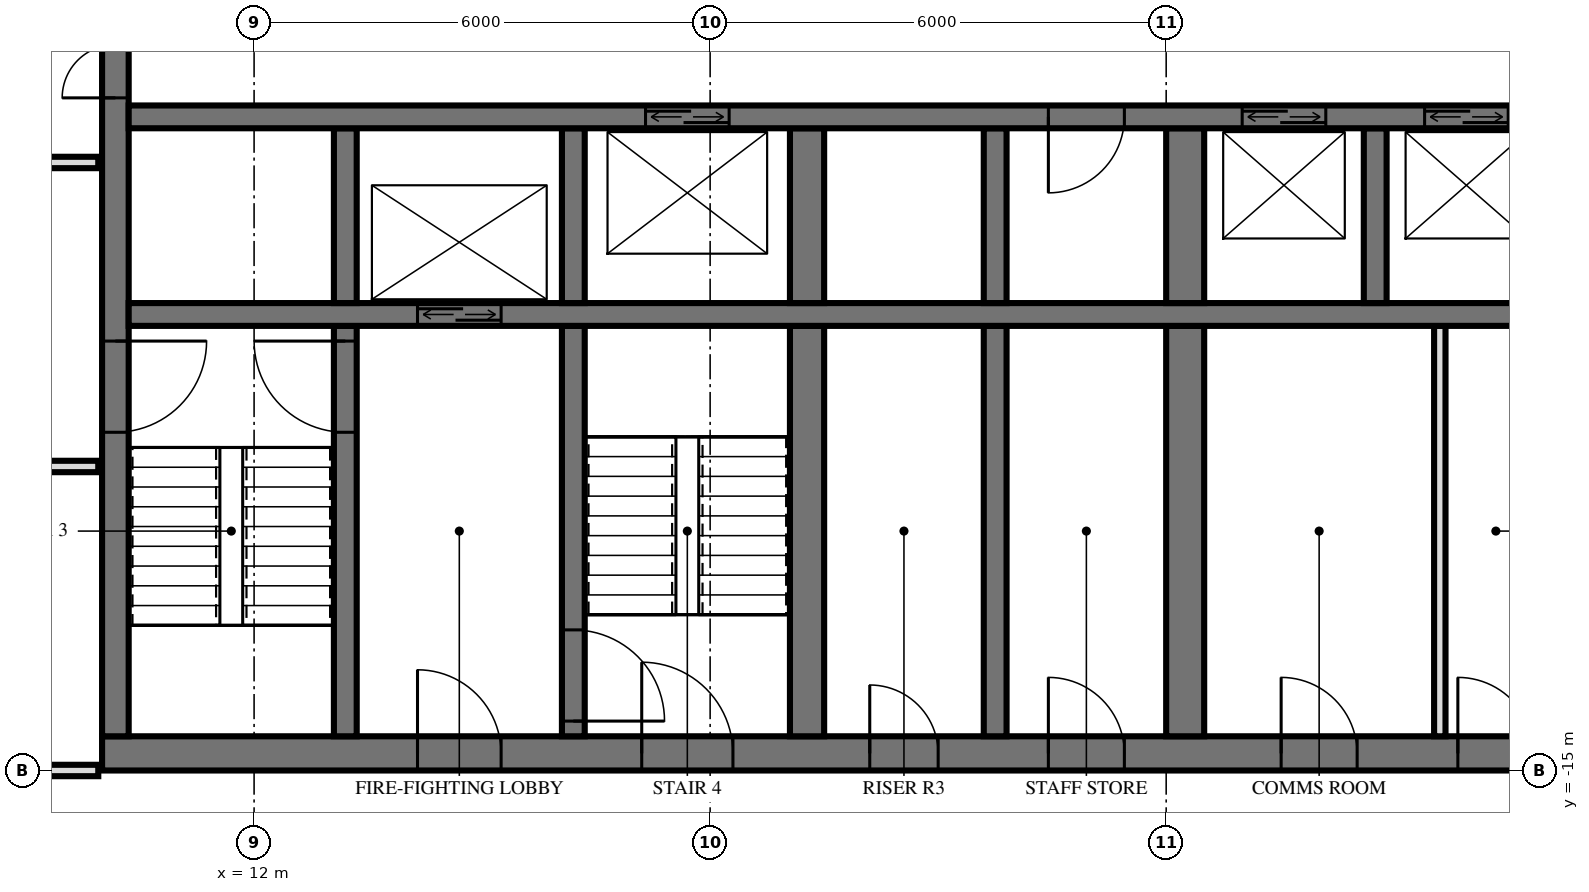
"""IFC4 building model, lengths in metres.
Left out: names, types, materials, properties, quantities, classifications, styles, units other than length and angle.
Written with IfcOpenShell. Run it as: python <this file> out.ifc"""

import sys

from ifc_helpers import new_model, si_unit, direction, frame, frame_2d, origin, place, context, subcontext, project, spatial, rectangle, extrude, element, fill, save


model = new_model("IFC4")
c1 = context("Model", 3, precision=1e-05, world=origin(), true_north=direction((0.0, 1.0)))
c2 = subcontext(c1, "Body", "Model", "MODEL_VIEW")
j1 = project(units=[si_unit("LENGTHUNIT", "METRE"), si_unit("PLANEANGLEUNIT", "RADIAN")], contexts=[c1])
p1 = place(None, origin())
s1 = spatial("IfcSite", under=j1, at=p1, CompositionType="ELEMENT")
p2 = place(p1, origin())
s2 = spatial("IfcBuilding", under=s1, at=p2, CompositionType="ELEMENT")
p3 = place(p2, frame((0.0, 0.0, 31.2)))
s3 = spatial("IfcBuildingStorey", under=s2, at=p3, CompositionType="ELEMENT", Elevation=31.2)
p4 = place(p3, frame((10.0, -14.775, 0.0), z_axis=(0.0, 0.0, 1.0), x_axis=(1.0, 0.0, 0.0)))
e1 = element("IfcWall", 1, at=p4, inside=s3, PredefinedType="SHEAR", context=c2, shape_type="SweptSolid", body=[
    extrude(rectangle(XDim=19.5, YDim=0.45, at=frame_2d((9.75, 0.0))), origin(), (0.0, 0.0, 1.0), 3.6),
])
p5 = place(p4, frame((7.1, 0.0, 0.0)))
e2 = element("IfcOpeningElement", 2, at=p5, cuts=e1, PredefinedType="OPENING", context=c2, shape_type="SweptSolid", body=[
    extrude(rectangle(XDim=1.2, YDim=2.1, at=frame_2d((0.6, 1.05))), frame((0.0, 0.235, 0.0), z_axis=(0.0, -1.0, 0.0), x_axis=(1.0, 0.0, 0.0)), (0.0, 0.0, 1.0), 0.47),
])
p6 = place(p4, frame((4.15, 0.0, 0.0)))
e3 = element("IfcOpeningElement", 3, at=p6, cuts=e1, PredefinedType="OPENING", context=c2, shape_type="SweptSolid", body=[
    extrude(rectangle(XDim=1.1, YDim=2.1, at=frame_2d((0.55, 1.05))), frame((0.0, 0.235, 0.0), z_axis=(0.0, -1.0, 0.0), x_axis=(1.0, 0.0, 0.0)), (0.0, 0.0, 1.0), 0.47),
])
p7 = place(p4, frame((10.1, 0.0, 0.0)))
e4 = element("IfcOpeningElement", 4, at=p7, cuts=e1, PredefinedType="OPENING", context=c2, shape_type="SweptSolid", body=[
    extrude(rectangle(XDim=0.9, YDim=2.1, at=frame_2d((0.45, 1.05))), frame((0.0, 0.235, 0.0), z_axis=(0.0, -1.0, 0.0), x_axis=(1.0, 0.0, 0.0)), (0.0, 0.0, 1.0), 0.47),
])
p8 = place(p4, frame((12.45, 0.0, 0.0)))
e5 = element("IfcOpeningElement", 5, at=p8, cuts=e1, PredefinedType="OPENING", context=c2, shape_type="SweptSolid", body=[
    extrude(rectangle(XDim=1.0, YDim=2.1, at=frame_2d((0.5, 1.05))), frame((0.0, 0.235, 0.0), z_axis=(0.0, -1.0, 0.0), x_axis=(1.0, 0.0, 0.0)), (0.0, 0.0, 1.0), 0.47),
])
p9 = place(p4, frame((15.512, 0.0, 0.0)))
e6 = element("IfcOpeningElement", 6, at=p9, cuts=e1, PredefinedType="OPENING", context=c2, shape_type="SweptSolid", body=[
    extrude(rectangle(XDim=1.0, YDim=2.1, at=frame_2d((0.5, 1.05))), frame((0.0, 0.235, 0.0), z_axis=(0.0, -1.0, 0.0), x_axis=(1.0, 0.0, 0.0)), (0.0, 0.0, 1.0), 0.47),
])
p10 = place(p4, frame((17.837, 0.0, 0.0)))
e7 = element("IfcOpeningElement", 7, at=p10, cuts=e1, PredefinedType="OPENING", context=c2, shape_type="SweptSolid", body=[
    extrude(rectangle(XDim=1.0, YDim=2.1, at=frame_2d((0.5, 1.05))), frame((0.0, 0.235, 0.0), z_axis=(0.0, -1.0, 0.0), x_axis=(1.0, 0.0, 0.0)), (0.0, 0.0, 1.0), 0.47),
])
p11 = place(p3, frame((10.175, -14.55, 0.0), z_axis=(0.0, 0.0, 1.0), x_axis=(0.0, 1.0, 0.0)))
e8 = element("IfcWall", 8, at=p11, inside=s3, PredefinedType="SHEAR", context=c2, shape_type="SweptSolid", body=[
    extrude(rectangle(XDim=14.1, YDim=0.35, at=frame_2d((7.05, 0.0))), origin(), (0.0, 0.0, 1.0), 3.6),
])
p12 = place(p11, frame((8.4, 0.0, 0.0)))
e9 = element("IfcOpeningElement", 9, at=p12, cuts=e8, PredefinedType="OPENING", context=c2, shape_type="SweptSolid", body=[
    extrude(rectangle(XDim=1.4, YDim=2.4, at=frame_2d((0.7, 1.2))), frame((0.0, 0.185, 0.0), z_axis=(0.0, -1.0, 0.0), x_axis=(1.0, 0.0, 0.0)), (0.0, 0.0, 1.0), 0.37),
])
p13 = place(p11, frame((10.0, 0.0, 0.0)))
e10 = element("IfcOpeningElement", 10, at=p13, cuts=e8, PredefinedType="OPENING", context=c2, shape_type="SweptSolid", body=[
    extrude(rectangle(XDim=1.4, YDim=2.4, at=frame_2d((0.7, 1.2))), frame((0.0, 0.185, 0.0), z_axis=(0.0, -1.0, 0.0), x_axis=(1.0, 0.0, 0.0)), (0.0, 0.0, 1.0), 0.37),
])
p14 = place(p11, frame((4.0, 0.0, 0.0)))
e11 = element("IfcOpeningElement", 11, at=p14, cuts=e8, PredefinedType="OPENING", context=c2, shape_type="SweptSolid", body=[
    extrude(rectangle(XDim=1.2, YDim=2.1, at=frame_2d((0.6, 1.05))), frame((0.0, 0.185, 0.0), z_axis=(0.0, -1.0, 0.0), x_axis=(1.0, 0.0, 0.0)), (0.0, 0.0, 1.0), 0.37),
])
p15 = place(p3, frame((10.35, -6.4, 0.0), z_axis=(0.0, 0.0, 1.0), x_axis=(1.0, 0.0, 0.0)))
e12 = element("IfcWall", 12, at=p15, inside=s3, PredefinedType="SHEAR", context=c2, shape_type="SweptSolid", body=[
    extrude(rectangle(XDim=18.7, YDim=0.3, at=frame_2d((9.35, 0.0))), origin(), (0.0, 0.0, 1.0), 3.6),
])
p16 = place(p15, frame((14.65, 0.0, 0.0)))
e13 = element("IfcOpeningElement", 13, at=p16, cuts=e12, PredefinedType="OPENING", context=c2, shape_type="SweptSolid", body=[
    extrude(rectangle(XDim=1.1, YDim=2.1, at=frame_2d((0.55, 1.05))), frame((0.0, 0.16, 0.0), z_axis=(0.0, -1.0, 0.0), x_axis=(1.0, 0.0, 0.0)), (0.0, 0.0, 1.0), 0.32),
])
p17 = place(p15, frame((17.05, 0.0, 0.0)))
e14 = element("IfcOpeningElement", 14, at=p17, cuts=e12, PredefinedType="OPENING", context=c2, shape_type="SweptSolid", body=[
    extrude(rectangle(XDim=1.1, YDim=2.1, at=frame_2d((0.55, 1.05))), frame((0.0, 0.16, 0.0), z_axis=(0.0, -1.0, 0.0), x_axis=(1.0, 0.0, 0.0)), (0.0, 0.0, 1.0), 0.32),
])
p18 = place(p15, frame((6.8, 0.0, 0.0)))
e15 = element("IfcOpeningElement", 15, at=p18, cuts=e12, PredefinedType="OPENING", context=c2, shape_type="SweptSolid", body=[
    extrude(rectangle(XDim=1.1, YDim=2.1, at=frame_2d((0.55, 1.05))), frame((0.0, 0.16, 0.0), z_axis=(0.0, -1.0, 0.0), x_axis=(1.0, 0.0, 0.0)), (0.0, 0.0, 1.0), 0.32),
])
p19 = place(p15, frame((12.1, 0.0, 0.0)))
e16 = element("IfcOpeningElement", 16, at=p19, cuts=e12, PredefinedType="OPENING", context=c2, shape_type="SweptSolid", body=[
    extrude(rectangle(XDim=1.0, YDim=2.1, at=frame_2d((0.5, 1.05))), frame((0.0, 0.16, 0.0), z_axis=(0.0, -1.0, 0.0), x_axis=(1.0, 0.0, 0.0)), (0.0, 0.0, 1.0), 0.32),
])
p20 = place(p3, frame((10.35, -9.0, 0.0), z_axis=(0.0, 0.0, 1.0), x_axis=(1.0, 0.0, 0.0)))
e17 = element("IfcWall", 17, at=p20, inside=s3, PredefinedType="SHEAR", context=c2, shape_type="SweptSolid", body=[
    extrude(rectangle(XDim=18.7, YDim=0.3, at=frame_2d((9.35, 0.0))), origin(), (0.0, 0.0, 1.0), 3.6),
])
p21 = place(p20, frame((3.8, 0.0, 0.0)))
e18 = element("IfcOpeningElement", 18, at=p21, cuts=e17, PredefinedType="OPENING", context=c2, shape_type="SweptSolid", body=[
    extrude(rectangle(XDim=1.1, YDim=2.1, at=frame_2d((0.55, 1.05))), frame((0.0, 0.16, 0.0), z_axis=(0.0, -1.0, 0.0), x_axis=(1.0, 0.0, 0.0)), (0.0, 0.0, 1.0), 0.32),
])
p22 = place(p3, frame((13.2, -8.85, 0.0), z_axis=(0.0, 0.0, 1.0), x_axis=(0.0, 1.0, 0.0)))
e19 = element("IfcWall", 19, at=p22, inside=s3, PredefinedType="SHEAR", context=c2, shape_type="SweptSolid", body=[
    extrude(rectangle(XDim=2.3, YDim=0.3, at=frame_2d((1.15, 0.0))), origin(), (0.0, 0.0, 1.0), 3.6),
])
p23 = place(p3, frame((13.2, -14.55, 0.0), z_axis=(0.0, 0.0, 1.0), x_axis=(0.0, 1.0, 0.0)))
e20 = element("IfcWall", 20, at=p23, inside=s3, PredefinedType="SHEAR", context=c2, shape_type="SweptSolid", body=[
    extrude(rectangle(XDim=5.4, YDim=0.3, at=frame_2d((2.7, 0.0))), origin(), (0.0, 0.0, 1.0), 3.6),
])
p24 = place(p23, frame((4.0, 0.0, 0.0)))
e21 = element("IfcOpeningElement", 21, at=p24, cuts=e20, PredefinedType="OPENING", context=c2, shape_type="SweptSolid", body=[
    extrude(rectangle(XDim=1.2, YDim=2.1, at=frame_2d((0.6, 1.05))), frame((0.0, 0.16, 0.0), z_axis=(0.0, -1.0, 0.0), x_axis=(1.0, 0.0, 0.0)), (0.0, 0.0, 1.0), 0.32),
])
p25 = place(p3, frame((16.2, -8.85, 0.0), z_axis=(0.0, 0.0, 1.0), x_axis=(0.0, 1.0, 0.0)))
e22 = element("IfcWall", 22, at=p25, inside=s3, PredefinedType="SHEAR", context=c2, shape_type="SweptSolid", body=[
    extrude(rectangle(XDim=2.3, YDim=0.3, at=frame_2d((1.15, 0.0))), origin(), (0.0, 0.0, 1.0), 3.6),
])
p26 = place(p3, frame((16.2, -14.55, 0.0), z_axis=(0.0, 0.0, 1.0), x_axis=(0.0, 1.0, 0.0)))
e23 = element("IfcWall", 23, at=p26, inside=s3, PredefinedType="SHEAR", context=c2, shape_type="SweptSolid", body=[
    extrude(rectangle(XDim=5.4, YDim=0.3, at=frame_2d((2.7, 0.0))), origin(), (0.0, 0.0, 1.0), 3.6),
])
p27 = place(p26, frame((0.2, 0.0, 0.0)))
e24 = element("IfcOpeningElement", 24, at=p27, cuts=e23, PredefinedType="OPENING", context=c2, shape_type="SweptSolid", body=[
    extrude(rectangle(XDim=1.2, YDim=2.1, at=frame_2d((0.6, 1.05))), frame((0.0, 0.16, 0.0), z_axis=(0.0, -1.0, 0.0), x_axis=(1.0, 0.0, 0.0)), (0.0, 0.0, 1.0), 0.32),
])
p28 = place(p3, frame((19.275, -8.85, 0.0), z_axis=(0.0, 0.0, 1.0), x_axis=(0.0, 1.0, 0.0)))
e25 = element("IfcWall", 25, at=p28, inside=s3, PredefinedType="SHEAR", context=c2, shape_type="SweptSolid", body=[
    extrude(rectangle(XDim=2.3, YDim=0.45, at=frame_2d((1.15, 0.0))), origin(), (0.0, 0.0, 1.0), 3.6),
])
p29 = place(p3, frame((19.275, -14.55, 0.0), z_axis=(0.0, 0.0, 1.0), x_axis=(0.0, 1.0, 0.0)))
e26 = element("IfcWall", 26, at=p29, inside=s3, PredefinedType="SHEAR", context=c2, shape_type="SweptSolid", body=[
    extrude(rectangle(XDim=5.4, YDim=0.45, at=frame_2d((2.7, 0.0))), origin(), (0.0, 0.0, 1.0), 3.6),
])
p30 = place(p3, frame((21.75, -8.85, 0.0), z_axis=(0.0, 0.0, 1.0), x_axis=(0.0, 1.0, 0.0)))
e27 = element("IfcWall", 27, at=p30, inside=s3, PredefinedType="SHEAR", context=c2, shape_type="SweptSolid", body=[
    extrude(rectangle(XDim=2.3, YDim=0.3, at=frame_2d((1.15, 0.0))), origin(), (0.0, 0.0, 1.0), 3.6),
])
p31 = place(p3, frame((21.75, -14.55, 0.0), z_axis=(0.0, 0.0, 1.0), x_axis=(0.0, 1.0, 0.0)))
e28 = element("IfcWall", 28, at=p31, inside=s3, PredefinedType="SHEAR", context=c2, shape_type="SweptSolid", body=[
    extrude(rectangle(XDim=5.4, YDim=0.3, at=frame_2d((2.7, 0.0))), origin(), (0.0, 0.0, 1.0), 3.6),
])
p32 = place(p3, frame((24.25, -8.85, 0.0), z_axis=(0.0, 0.0, 1.0), x_axis=(0.0, 1.0, 0.0)))
e29 = element("IfcWall", 29, at=p32, inside=s3, PredefinedType="SHEAR", context=c2, shape_type="SweptSolid", body=[
    extrude(rectangle(XDim=2.3, YDim=0.5, at=frame_2d((1.15, 0.0))), origin(), (0.0, 0.0, 1.0), 3.6),
])
p33 = place(p3, frame((24.25, -14.55, 0.0), z_axis=(0.0, 0.0, 1.0), x_axis=(0.0, 1.0, 0.0)))
e30 = element("IfcWall", 30, at=p33, inside=s3, PredefinedType="SHEAR", context=c2, shape_type="SweptSolid", body=[
    extrude(rectangle(XDim=5.4, YDim=0.5, at=frame_2d((2.7, 0.0))), origin(), (0.0, 0.0, 1.0), 3.6),
])
p34 = place(p3, frame((26.75, -8.85, 0.0), z_axis=(0.0, 0.0, 1.0), x_axis=(0.0, 1.0, 0.0)))
e31 = element("IfcWall", 31, at=p34, inside=s3, PredefinedType="SHEAR", context=c2, shape_type="SweptSolid", body=[
    extrude(rectangle(XDim=2.3, YDim=0.3, at=frame_2d((1.15, 0.0))), origin(), (0.0, 0.0, 1.0), 3.6),
])
p35 = place(p3, frame((27.6, -14.55, 0.0), z_axis=(0.0, 0.0, 1.0), x_axis=(0.0, 1.0, 0.0)))
e32 = element("IfcWall", 32, at=p35, inside=s3, PredefinedType="PARTITIONING", context=c2, shape_type="SweptSolid", body=[
    extrude(rectangle(XDim=5.4, YDim=0.15, at=frame_2d((2.7, 0.0))), origin(), (0.0, 0.0, 1.0), 3.3),
])
p36 = place(p3, frame((-9.95, -15.0, 0.0), z_axis=(0.0, 0.0, 1.0), x_axis=(1.0, 0.0, 0.0)))
e33 = element("IfcWall", 33, at=p36, inside=s3, PredefinedType="PARTITIONING", context=c2, shape_type="SweptSolid", body=[
    extrude(rectangle(XDim=19.9, YDim=0.15, at=frame_2d((9.95, 0.0))), origin(), (0.0, 0.0, 1.0), 2.684),
])
p37 = place(p36, frame((9.45, 0.0, 0.0)))
e34 = element("IfcOpeningElement", 34, at=p37, cuts=e33, PredefinedType="OPENING", context=c2, shape_type="SweptSolid", body=[
    extrude(rectangle(XDim=1.0, YDim=2.1, at=frame_2d((0.5, 1.05))), frame((0.0, 0.085, 0.0), z_axis=(0.0, -1.0, 0.0), x_axis=(1.0, 0.0, 0.0)), (0.0, 0.0, 1.0), 0.17),
])
p38 = place(p3, frame((-9.95, -11.0, 0.0), z_axis=(0.0, 0.0, 1.0), x_axis=(1.0, 0.0, 0.0)))
e35 = element("IfcWall", 35, at=p38, inside=s3, PredefinedType="PARTITIONING", context=c2, shape_type="SweptSolid", body=[
    extrude(rectangle(XDim=19.9, YDim=0.15, at=frame_2d((9.95, 0.0))), origin(), (0.0, 0.0, 1.0), 3.32),
])
p39 = place(p38, frame((9.45, 0.0, 0.0)))
e36 = element("IfcOpeningElement", 36, at=p39, cuts=e35, PredefinedType="OPENING", context=c2, shape_type="SweptSolid", body=[
    extrude(rectangle(XDim=1.0, YDim=2.1, at=frame_2d((0.5, 1.05))), frame((0.0, 0.085, 0.0), z_axis=(0.0, -1.0, 0.0), x_axis=(1.0, 0.0, 0.0)), (0.0, 0.0, 1.0), 0.17),
])
p40 = place(p38, frame((15.45, 0.0, 0.0)))
e37 = element("IfcOpeningElement", 37, at=p40, cuts=e35, PredefinedType="OPENING", context=c2, shape_type="SweptSolid", body=[
    extrude(rectangle(XDim=1.0, YDim=2.1, at=frame_2d((0.5, 1.05))), frame((0.0, 0.085, 0.0), z_axis=(0.0, -1.0, 0.0), x_axis=(1.0, 0.0, 0.0)), (0.0, 0.0, 1.0), 0.17),
])
p41 = place(p3, frame((-9.95, -7.0, 0.0), z_axis=(0.0, 0.0, 1.0), x_axis=(1.0, 0.0, 0.0)))
e38 = element("IfcWall", 38, at=p41, inside=s3, PredefinedType="PARTITIONING", context=c2, shape_type="SweptSolid", body=[
    extrude(rectangle(XDim=19.9, YDim=0.15, at=frame_2d((9.95, 0.0))), origin(), (0.0, 0.0, 1.0), 3.32),
])
p42 = place(p41, frame((9.45, 0.0, 0.0)))
e39 = element("IfcOpeningElement", 39, at=p42, cuts=e38, PredefinedType="OPENING", context=c2, shape_type="SweptSolid", body=[
    extrude(rectangle(XDim=1.0, YDim=2.1, at=frame_2d((0.5, 1.05))), frame((0.0, 0.085, 0.0), z_axis=(0.0, -1.0, 0.0), x_axis=(1.0, 0.0, 0.0)), (0.0, 0.0, 1.0), 0.17),
])
p43 = place(p41, frame((3.45, 0.0, 0.0)))
e40 = element("IfcOpeningElement", 40, at=p43, cuts=e38, PredefinedType="OPENING", context=c2, shape_type="SweptSolid", body=[
    extrude(rectangle(XDim=1.0, YDim=2.1, at=frame_2d((0.5, 1.05))), frame((0.0, 0.085, 0.0), z_axis=(0.0, -1.0, 0.0), x_axis=(1.0, 0.0, 0.0)), (0.0, 0.0, 1.0), 0.17),
])
p44 = place(p16, origin())
e41 = element("IfcDoor", 41, at=p44, inside=s3, OperationType="DOUBLE_DOOR_SLIDING", PredefinedType="USERDEFINED", context=c2, shape_type="SweptSolid", body=[
    extrude(rectangle(XDim=1.1, YDim=2.1, at=frame_2d((0.55, 1.05))), frame((0.0, 0.025, 0.0), z_axis=(0.0, -1.0, 0.0), x_axis=(1.0, 0.0, 0.0)), (0.0, 0.0, 1.0), 0.05),
])
fill(e13, e41)
p45 = place(p17, origin())
e42 = element("IfcDoor", 42, at=p45, inside=s3, OperationType="DOUBLE_DOOR_SLIDING", PredefinedType="USERDEFINED", context=c2, shape_type="SweptSolid", body=[
    extrude(rectangle(XDim=1.1, YDim=2.1, at=frame_2d((0.55, 1.05))), frame((0.0, 0.025, 0.0), z_axis=(0.0, -1.0, 0.0), x_axis=(1.0, 0.0, 0.0)), (0.0, 0.0, 1.0), 0.05),
])
fill(e14, e42)
p46 = place(p21, origin())
e43 = element("IfcDoor", 43, at=p46, inside=s3, OperationType="DOUBLE_DOOR_SLIDING", PredefinedType="USERDEFINED", context=c2, shape_type="SweptSolid", body=[
    extrude(rectangle(XDim=1.1, YDim=2.1, at=frame_2d((0.55, 1.05))), frame((0.0, 0.025, 0.0), z_axis=(0.0, -1.0, 0.0), x_axis=(1.0, 0.0, 0.0)), (0.0, 0.0, 1.0), 0.05),
])
fill(e18, e43)
p47 = place(p18, origin())
e44 = element("IfcDoor", 44, at=p47, inside=s3, OperationType="DOUBLE_DOOR_SLIDING", PredefinedType="USERDEFINED", context=c2, shape_type="SweptSolid", body=[
    extrude(rectangle(XDim=1.1, YDim=2.1, at=frame_2d((0.55, 1.05))), frame((0.0, 0.025, 0.0), z_axis=(0.0, -1.0, 0.0), x_axis=(1.0, 0.0, 0.0)), (0.0, 0.0, 1.0), 0.05),
])
fill(e15, e44)
p48 = place(p12, origin())
e45 = element("IfcDoor", 45, at=p48, inside=s3, OperationType="DOUBLE_DOOR_SINGLE_SWING", PredefinedType="DOOR", context=c2, shape_type="SweptSolid", body=[
    extrude(rectangle(XDim=1.4, YDim=2.4, at=frame_2d((0.7, 1.2))), frame((0.0, 0.025, 0.0), z_axis=(0.0, -1.0, 0.0), x_axis=(1.0, 0.0, 0.0)), (0.0, 0.0, 1.0), 0.05),
])
fill(e9, e45)
p49 = place(p14, frame((0.6, 0.0, 0.0), z_axis=(0.0, 0.0, 1.0), x_axis=(-1.0, 0.0, 0.0)))
e46 = element("IfcDoor", 46, at=p49, inside=s3, OperationType="SINGLE_SWING_RIGHT", PredefinedType="DOOR", context=c2, shape_type="SweptSolid", body=[
    extrude(rectangle(XDim=1.2, YDim=2.1, at=frame_2d((0.0, 1.05))), frame((0.0, -0.025, 0.0), z_axis=(0.0, 1.0, 0.0), x_axis=(-1.0, 0.0, 0.0)), (0.0, 0.0, 1.0), 0.05),
])
fill(e11, e46)
p50 = place(p5, origin())
e47 = element("IfcDoor", 47, at=p50, inside=s3, OperationType="SINGLE_SWING_RIGHT", PredefinedType="DOOR", context=c2, shape_type="SweptSolid", body=[
    extrude(rectangle(XDim=1.2, YDim=2.1, at=frame_2d((0.6, 1.05))), frame((0.0, 0.025, 0.0), z_axis=(0.0, -1.0, 0.0), x_axis=(1.0, 0.0, 0.0)), (0.0, 0.0, 1.0), 0.05),
])
fill(e2, e47)
p51 = place(p6, origin())
e48 = element("IfcDoor", 48, at=p51, inside=s3, OperationType="SINGLE_SWING_RIGHT", PredefinedType="DOOR", context=c2, shape_type="SweptSolid", body=[
    extrude(rectangle(XDim=1.1, YDim=2.1, at=frame_2d((0.55, 1.05))), frame((0.0, 0.025, 0.0), z_axis=(0.0, -1.0, 0.0), x_axis=(1.0, 0.0, 0.0)), (0.0, 0.0, 1.0), 0.05),
])
fill(e3, e48)
p52 = place(p7, origin())
e49 = element("IfcDoor", 49, at=p52, inside=s3, OperationType="SINGLE_SWING_RIGHT", PredefinedType="DOOR", context=c2, shape_type="SweptSolid", body=[
    extrude(rectangle(XDim=0.9, YDim=2.1, at=frame_2d((0.45, 1.05))), frame((0.0, 0.025, 0.0), z_axis=(0.0, -1.0, 0.0), x_axis=(1.0, 0.0, 0.0)), (0.0, 0.0, 1.0), 0.05),
])
fill(e4, e49)
p53 = place(p8, origin())
e50 = element("IfcDoor", 50, at=p53, inside=s3, OperationType="SINGLE_SWING_RIGHT", PredefinedType="DOOR", context=c2, shape_type="SweptSolid", body=[
    extrude(rectangle(XDim=1.0, YDim=2.1, at=frame_2d((0.5, 1.05))), frame((0.0, 0.025, 0.0), z_axis=(0.0, -1.0, 0.0), x_axis=(1.0, 0.0, 0.0)), (0.0, 0.0, 1.0), 0.05),
])
fill(e5, e50)
p54 = place(p9, origin())
e51 = element("IfcDoor", 51, at=p54, inside=s3, OperationType="SINGLE_SWING_RIGHT", PredefinedType="DOOR", context=c2, shape_type="SweptSolid", body=[
    extrude(rectangle(XDim=1.0, YDim=2.1, at=frame_2d((0.5, 1.05))), frame((0.0, 0.025, 0.0), z_axis=(0.0, -1.0, 0.0), x_axis=(1.0, 0.0, 0.0)), (0.0, 0.0, 1.0), 0.05),
])
fill(e6, e51)
p55 = place(p10, origin())
e52 = element("IfcDoor", 52, at=p55, inside=s3, OperationType="SINGLE_SWING_RIGHT", PredefinedType="DOOR", context=c2, shape_type="SweptSolid", body=[
    extrude(rectangle(XDim=1.0, YDim=2.1, at=frame_2d((0.5, 1.05))), frame((0.0, 0.025, 0.0), z_axis=(0.0, -1.0, 0.0), x_axis=(1.0, 0.0, 0.0)), (0.0, 0.0, 1.0), 0.05),
])
fill(e7, e52)
p56 = place(p19, frame((0.5, 0.0, 0.0), z_axis=(0.0, 0.0, 1.0), x_axis=(-1.0, 0.0, 0.0)))
e53 = element("IfcDoor", 53, at=p56, inside=s3, OperationType="SINGLE_SWING_LEFT", PredefinedType="DOOR", context=c2, shape_type="SweptSolid", body=[
    extrude(rectangle(XDim=1.0, YDim=2.1, at=frame_2d((0.0, 1.05))), frame((0.0, -0.025, 0.0), z_axis=(0.0, 1.0, 0.0), x_axis=(-1.0, 0.0, 0.0)), (0.0, 0.0, 1.0), 0.05),
])
fill(e16, e53)
p57 = place(p24, origin())
e54 = element("IfcDoor", 54, at=p57, inside=s3, OperationType="SINGLE_SWING_LEFT", PredefinedType="DOOR", context=c2, shape_type="SweptSolid", body=[
    extrude(rectangle(XDim=1.2, YDim=2.1, at=frame_2d((0.6, 1.05))), frame((0.0, 0.025, 0.0), z_axis=(0.0, -1.0, 0.0), x_axis=(1.0, 0.0, 0.0)), (0.0, 0.0, 1.0), 0.05),
])
fill(e21, e54)
p58 = place(p27, frame((0.6, 0.0, 0.0), z_axis=(0.0, 0.0, 1.0), x_axis=(-1.0, 0.0, 0.0)))
e55 = element("IfcDoor", 55, at=p58, inside=s3, OperationType="SINGLE_SWING_LEFT", PredefinedType="DOOR", context=c2, shape_type="SweptSolid", body=[
    extrude(rectangle(XDim=1.2, YDim=2.1, at=frame_2d((0.0, 1.05))), frame((0.0, -0.025, 0.0), z_axis=(0.0, 1.0, 0.0), x_axis=(-1.0, 0.0, 0.0)), (0.0, 0.0, 1.0), 0.05),
])
fill(e24, e55)
save(model, sys.argv[1])
